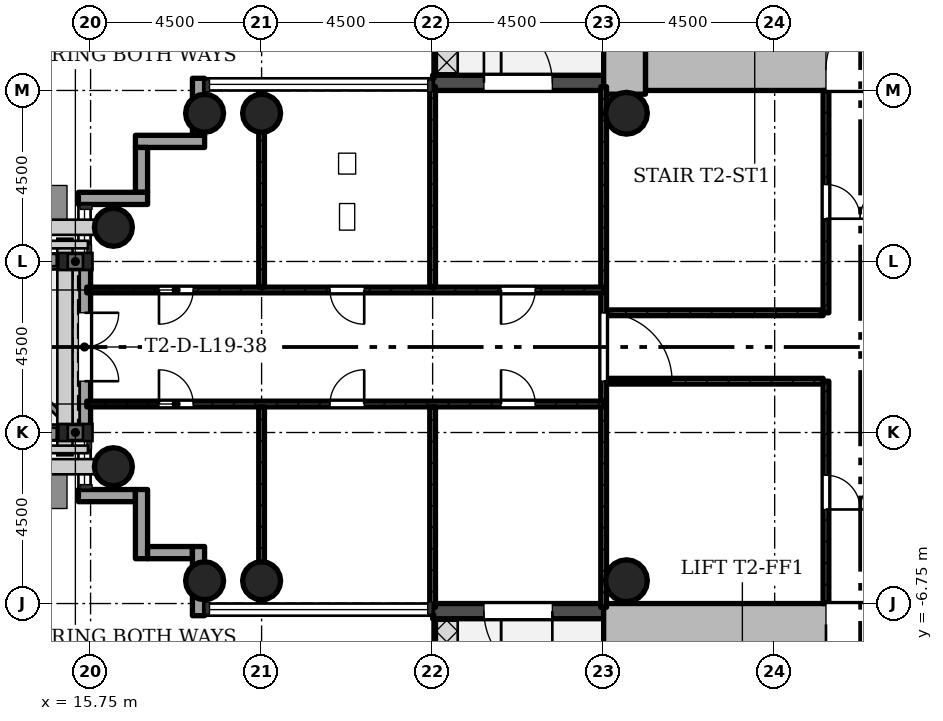
"""IFC4 building model, lengths in metres.
Left out: names, types, materials, properties, quantities, classifications, styles, units other than length and angle.
Written with IfcOpenShell. Run it as: python <this file> out.ifc"""

import sys

from ifc_helpers import new_model, si_unit, direction, frame, frame_2d, origin, origin_2d, place, context, subcontext, project, spatial, rectangle, hollow_circle, extrude, element, fill, save


model = new_model("IFC4")
c1 = context("Model", 3, precision=1e-05, world=origin(), true_north=direction((0.0, 1.0)))
c2 = subcontext(c1, "Body", "Model", "MODEL_VIEW")
j1 = project(units=[si_unit("LENGTHUNIT", "METRE"), si_unit("PLANEANGLEUNIT", "RADIAN")], contexts=[c1])
p1 = place(None, origin())
s1 = spatial("IfcSite", under=j1, at=p1, CompositionType="ELEMENT")
p2 = place(p1, origin())
s2 = spatial("IfcBuilding", under=s1, at=p2, CompositionType="ELEMENT")
p3 = place(p2, frame((0.0, 0.0, 72.1)))
s3 = spatial("IfcBuildingStorey", under=s2, at=p3, CompositionType="ELEMENT", Elevation=72.1)
p4 = place(p3, frame((30.35, 7.3, 0.0), z_axis=(0.0, 0.0, 1.0), x_axis=(1.0, 0.0, 0.0)))
e1 = element("IfcWall", 1, at=p4, inside=s3, PredefinedType="SHEAR", context=c2, shape_type="SweptSolid", body=[
    extrude(rectangle(XDim=12.4, YDim=1.1, at=frame_2d((6.2, 0.0))), origin(), (0.0, 0.0, 1.0), 4.5),
])
p5 = place(p4, frame((4.75, 0.0, 0.0)))
e2 = element("IfcOpeningElement", 2, at=p5, cuts=e1, PredefinedType="OPENING", context=c2, shape_type="SweptSolid", body=[
    extrude(rectangle(XDim=1.8, YDim=2.1, at=frame_2d((0.9, 1.05))), frame((0.0, 0.56, 0.0), z_axis=(0.0, -1.0, 0.0), x_axis=(1.0, 0.0, 0.0)), (0.0, 0.0, 1.0), 1.12),
])
p6 = place(p3, frame((29.8, 15.248, 0.0), z_axis=(0.0, 0.0, 1.0), x_axis=(0.0, -1.0, 0.0)))
e3 = element("IfcWall", 3, at=p6, inside=s3, PredefinedType="SHEAR", context=c2, shape_type="SweptSolid", body=[
    extrude(rectangle(XDim=8.596, YDim=1.1, at=frame_2d((4.298, 0.0))), origin(), (0.0, 0.0, 1.0), 4.5),
])
p7 = place(p3, frame((41.65, -7.3, 0.0), z_axis=(0.0, 0.0, 1.0), x_axis=(-1.0, 0.0, 0.0)))
e4 = element("IfcWall", 4, at=p7, inside=s3, PredefinedType="SHEAR", context=c2, shape_type="SweptSolid", body=[
    extrude(rectangle(XDim=12.4, YDim=1.1, at=frame_2d((6.2, 0.0))), origin(), (0.0, 0.0, 1.0), 4.5),
])
p8 = place(p7, frame((4.75, 0.0, 0.0)))
e5 = element("IfcOpeningElement", 5, at=p8, cuts=e4, PredefinedType="OPENING", context=c2, shape_type="SweptSolid", body=[
    extrude(rectangle(XDim=1.8, YDim=2.1, at=frame_2d((0.9, 1.05))), frame((0.0, 0.56, 0.0), z_axis=(0.0, -1.0, 0.0), x_axis=(1.0, 0.0, 0.0)), (0.0, 0.0, 1.0), 1.12),
])
for number, where, z_axis, x_axis in (
    (6, (20.25, 6.15, 0.0), (0.0, 0.0, 1.0), (1.0, 0.0, 0.0)),
    (7, (20.25, -6.15, 0.0), (0.0, 0.0, 1.0), (1.0, 0.0, 0.0)),
    (8, (18.75, 6.15, 0.0), (0.0, 0.0, 1.0), (1.0, 0.0, 0.0)),
    (9, (18.75, -6.15, 0.0), (0.0, 0.0, 1.0), (1.0, 0.0, 0.0)),
    (10, (16.35, 3.15, 0.0), (0.0, 0.0, 1.0), (1.0, 0.0, 0.0)),
    (11, (16.35, -3.15, 0.0), (0.0, 0.0, 1.0), (1.0, 0.0, 0.0)),
):
    element("IfcColumn", number, at=place(p3, frame(where, z_axis=z_axis, x_axis=x_axis)), inside=s3, PredefinedType="COLUMN", context=c2, shape_type="SweptSolid", body=[
        extrude(hollow_circle(Radius=0.5, WallThickness=0.036, at=origin_2d()), origin(), (0.0, 0.0, 1.0), 4.5),
    ])
for number, where, z_axis, x_axis in (
    (12, (29.85, 6.15, 0.0), (0.0, 0.0, 1.0), (1.0, 0.0, 0.0)),
    (13, (29.85, -6.15, 0.0), (0.0, 0.0, 1.0), (1.0, 0.0, 0.0)),
):
    element("IfcColumn", number, at=place(p3, frame(where, z_axis=z_axis, x_axis=x_axis)), inside=s3, PredefinedType="COLUMN", context=c2, shape_type="SweptSolid", body=[
        extrude(hollow_circle(Radius=0.55, WallThickness=0.04, at=origin_2d()), origin(), (0.0, 0.0, 1.0), 4.5),
    ])
p9 = place(p3, frame((29.25, 6.95, -0.02), z_axis=(0.0, 0.0, 1.0), x_axis=(-1.0, 0.0, 0.0)))
e14 = element("IfcWall", 14, at=p9, inside=s3, PredefinedType="STANDARD", context=c2, shape_type="SweptSolid", body=[
    extrude(rectangle(XDim=4.5, YDim=0.4, at=frame_2d((2.25, 0.0))), origin(), (0.0, 0.0, 1.0), 4.22),
])
p10 = place(p9, frame((1.35, 0.0, 0.02)))
e15 = element("IfcOpeningElement", 15, at=p10, cuts=e14, PredefinedType="OPENING", context=c2, shape_type="SweptSolid", body=[
    extrude(rectangle(XDim=1.8, YDim=2.1, at=frame_2d((0.9, 1.05))), frame((0.0, 0.21, 0.0), z_axis=(0.0, -1.0, 0.0), x_axis=(1.0, 0.0, 0.0)), (0.0, 0.0, 1.0), 0.42),
])
p11 = place(p3, frame((18.59, 7.07, -0.3), z_axis=(0.0, 0.0, 1.0), x_axis=(0.0, -1.0, 0.0)))
e16 = element("IfcWall", 16, at=p11, inside=s3, PredefinedType="STANDARD", context=c2, shape_type="SweptSolid", body=[
    extrude(rectangle(XDim=1.5, YDim=0.32, at=frame_2d((0.75, 0.0))), origin(), (0.0, 0.0, 1.0), 4.5),
])
p12 = place(p3, frame((18.75, 5.41, -0.3), z_axis=(0.0, 0.0, 1.0), x_axis=(-1.0, 0.0, 0.0)))
e17 = element("IfcWall", 17, at=p12, inside=s3, PredefinedType="STANDARD", context=c2, shape_type="SweptSolid", body=[
    extrude(rectangle(XDim=1.82, YDim=0.32, at=frame_2d((0.91, 0.0))), origin(), (0.0, 0.0, 1.0), 4.5),
])
p13 = place(p3, frame((17.09, 5.25, -0.3), z_axis=(0.0, 0.0, 1.0), x_axis=(0.0, -1.0, 0.0)))
e18 = element("IfcWall", 18, at=p13, inside=s3, PredefinedType="STANDARD", context=c2, shape_type="SweptSolid", body=[
    extrude(rectangle(XDim=1.18, YDim=0.32, at=frame_2d((0.59, 0.0))), origin(), (0.0, 0.0, 1.0), 4.5),
])
p14 = place(p3, frame((17.25, 3.91, -0.3), z_axis=(0.0, 0.0, 1.0), x_axis=(-1.0, 0.0, 0.0)))
e19 = element("IfcWall", 19, at=p14, inside=s3, PredefinedType="STANDARD", context=c2, shape_type="SweptSolid", body=[
    extrude(rectangle(XDim=1.82, YDim=0.32, at=frame_2d((0.91, 0.0))), origin(), (0.0, 0.0, 1.0), 4.5),
])
p15 = place(p3, frame((15.59, 2.25, 0.0), z_axis=(0.0, 0.0, 1.0), x_axis=(0.0, -1.0, 0.0)))
e20 = element("IfcWall", 20, at=p15, inside=s3, PredefinedType="STANDARD", context=c2, shape_type="SweptSolid", body=[
    extrude(rectangle(XDim=4.5, YDim=0.32, at=frame_2d((2.25, 0.0))), origin(), (0.0, 0.0, 1.0), 4.2),
])
p16 = place(p15, frame((1.35, 0.0, 0.0)))
e21 = element("IfcOpeningElement", 21, at=p16, cuts=e20, PredefinedType="OPENING", context=c2, shape_type="SweptSolid", body=[
    extrude(rectangle(XDim=1.8, YDim=2.1, at=frame_2d((0.9, 1.05))), frame((0.0, 0.17, 0.0), z_axis=(0.0, -1.0, 0.0), x_axis=(1.0, 0.0, 0.0)), (0.0, 0.0, 1.0), 0.34),
])
p17 = place(p3, frame((15.43, -3.91, -0.3), z_axis=(0.0, 0.0, 1.0), x_axis=(1.0, 0.0, 0.0)))
e22 = element("IfcWall", 22, at=p17, inside=s3, PredefinedType="STANDARD", context=c2, shape_type="SweptSolid", body=[
    extrude(rectangle(XDim=1.5, YDim=0.32, at=frame_2d((0.75, 0.0))), origin(), (0.0, 0.0, 1.0), 4.5),
])
p18 = place(p3, frame((17.09, -3.75, -0.3), z_axis=(0.0, 0.0, 1.0), x_axis=(0.0, -1.0, 0.0)))
e23 = element("IfcWall", 23, at=p18, inside=s3, PredefinedType="STANDARD", context=c2, shape_type="SweptSolid", body=[
    extrude(rectangle(XDim=1.82, YDim=0.32, at=frame_2d((0.91, 0.0))), origin(), (0.0, 0.0, 1.0), 4.5),
])
p19 = place(p3, frame((17.25, -5.41, -0.3), z_axis=(0.0, 0.0, 1.0), x_axis=(1.0, 0.0, 0.0)))
e24 = element("IfcWall", 24, at=p19, inside=s3, PredefinedType="STANDARD", context=c2, shape_type="SweptSolid", body=[
    extrude(rectangle(XDim=1.18, YDim=0.32, at=frame_2d((0.59, 0.0))), origin(), (0.0, 0.0, 1.0), 4.5),
])
p20 = place(p3, frame((18.59, -5.25, -0.3), z_axis=(0.0, 0.0, 1.0), x_axis=(0.0, -1.0, 0.0)))
e25 = element("IfcWall", 25, at=p20, inside=s3, PredefinedType="STANDARD", context=c2, shape_type="SweptSolid", body=[
    extrude(rectangle(XDim=1.82, YDim=0.32, at=frame_2d((0.91, 0.0))), origin(), (0.0, 0.0, 1.0), 4.5),
])
p21 = place(p3, frame((24.75, -6.95, -0.02), z_axis=(0.0, 0.0, 1.0), x_axis=(1.0, 0.0, 0.0)))
e26 = element("IfcWall", 26, at=p21, inside=s3, PredefinedType="STANDARD", context=c2, shape_type="SweptSolid", body=[
    extrude(rectangle(XDim=4.5, YDim=0.4, at=frame_2d((2.25, 0.0))), origin(), (0.0, 0.0, 1.0), 4.22),
])
p22 = place(p21, frame((1.35, 0.0, 0.02)))
e27 = element("IfcOpeningElement", 27, at=p22, cuts=e26, PredefinedType="OPENING", context=c2, shape_type="SweptSolid", body=[
    extrude(rectangle(XDim=1.8, YDim=2.1, at=frame_2d((0.9, 1.05))), frame((0.0, 0.21, 0.0), z_axis=(0.0, -1.0, 0.0), x_axis=(1.0, 0.0, 0.0)), (0.0, 0.0, 1.0), 0.42),
])
p23 = place(p3, frame((35.1, 0.9, 0.0), z_axis=(0.0, 0.0, 1.0), x_axis=(0.0, 1.0, 0.0)))
e28 = element("IfcWall", 28, at=p23, inside=s3, PredefinedType="PARTITIONING", context=c2, shape_type="SweptSolid", body=[
    extrude(rectangle(XDim=5.85, YDim=0.15, at=frame_2d((2.925, 0.0))), origin(), (0.0, 0.0, 1.0), 4.08),
])
p24 = place(p23, frame((2.475, 0.0, 0.0)))
e29 = element("IfcOpeningElement", 29, at=p24, cuts=e28, PredefinedType="OPENING", context=c2, shape_type="SweptSolid", body=[
    extrude(rectangle(XDim=0.9, YDim=2.1, at=frame_2d((0.45, 1.05))), frame((0.0, 0.085, 0.0), z_axis=(0.0, -1.0, 0.0), x_axis=(1.0, 0.0, 0.0)), (0.0, 0.0, 1.0), 0.17),
])
p25 = place(p3, frame((35.025, 0.9, 0.0), z_axis=(0.0, 0.0, 1.0), x_axis=(-1.0, 0.0, 0.0)))
e30 = element("IfcWall", 30, at=p25, inside=s3, PredefinedType="PARTITIONING", context=c2, shape_type="SweptSolid", body=[
    extrude(rectangle(XDim=5.7, YDim=0.15, at=frame_2d((2.85, 0.0))), origin(), (0.0, 0.0, 1.0), 4.08),
])
p26 = place(p3, frame((35.1, -6.75, 0.0), z_axis=(0.0, 0.0, 1.0), x_axis=(0.0, 1.0, 0.0)))
e31 = element("IfcWall", 31, at=p26, inside=s3, PredefinedType="PARTITIONING", context=c2, shape_type="SweptSolid", body=[
    extrude(rectangle(XDim=5.85, YDim=0.15, at=frame_2d((2.925, 0.0))), origin(), (0.0, 0.0, 1.0), 4.08),
])
p27 = place(p26, frame((2.475, 0.0, 0.0)))
e32 = element("IfcOpeningElement", 32, at=p27, cuts=e31, PredefinedType="OPENING", context=c2, shape_type="SweptSolid", body=[
    extrude(rectangle(XDim=0.9, YDim=2.1, at=frame_2d((0.45, 1.05))), frame((0.0, 0.085, 0.0), z_axis=(0.0, -1.0, 0.0), x_axis=(1.0, 0.0, 0.0)), (0.0, 0.0, 1.0), 0.17),
])
p28 = place(p3, frame((35.025, -0.9, 0.0), z_axis=(0.0, 0.0, 1.0), x_axis=(-1.0, 0.0, 0.0)))
e33 = element("IfcWall", 33, at=p28, inside=s3, PredefinedType="PARTITIONING", context=c2, shape_type="SweptSolid", body=[
    extrude(rectangle(XDim=5.7, YDim=0.15, at=frame_2d((2.85, 0.0))), origin(), (0.0, 0.0, 1.0), 4.08),
])
p29 = place(p3, frame((29.25, -6.85, 0.0), z_axis=(0.0, 0.0, 1.0), x_axis=(0.0, 1.0, 0.0)))
e34 = element("IfcWall", 34, at=p29, inside=s3, PredefinedType="PARTITIONING", context=c2, shape_type="SweptSolid", body=[
    extrude(rectangle(XDim=13.7, YDim=0.15, at=frame_2d((6.85, 0.0))), origin(), (0.0, 0.0, 1.0), 4.08),
])
p30 = place(p29, frame((5.95, 0.0, 0.0)))
e35 = element("IfcOpeningElement", 35, at=p30, cuts=e34, PredefinedType="OPENING", context=c2, shape_type="SweptSolid", body=[
    extrude(rectangle(XDim=1.8, YDim=2.1, at=frame_2d((0.9, 1.05))), frame((0.0, 0.085, 0.0), z_axis=(0.0, -1.0, 0.0), x_axis=(1.0, 0.0, 0.0)), (0.0, 0.0, 1.0), 0.17),
])
p31 = place(p3, frame((29.25, 1.5, 0.0), z_axis=(0.0, 0.0, 1.0), x_axis=(-1.0, 0.0, 0.0)))
e36 = element("IfcWall", 36, at=p31, inside=s3, PredefinedType="PARTITIONING", context=c2, shape_type="SweptSolid", body=[
    extrude(rectangle(XDim=13.6, YDim=0.15, at=frame_2d((6.8, 0.0))), origin(), (0.0, 0.0, 1.0), 4.08),
])
p32 = place(p31, frame((1.8, 0.0, 0.0)))
e37 = element("IfcOpeningElement", 37, at=p32, cuts=e36, PredefinedType="OPENING", context=c2, shape_type="SweptSolid", body=[
    extrude(rectangle(XDim=0.9, YDim=2.1, at=frame_2d((0.45, 1.05))), frame((0.0, 0.085, 0.0), z_axis=(0.0, -1.0, 0.0), x_axis=(1.0, 0.0, 0.0)), (0.0, 0.0, 1.0), 0.17),
])
p33 = place(p31, frame((6.3, 0.0, 0.0)))
e38 = element("IfcOpeningElement", 38, at=p33, cuts=e36, PredefinedType="OPENING", context=c2, shape_type="SweptSolid", body=[
    extrude(rectangle(XDim=0.9, YDim=2.1, at=frame_2d((0.45, 1.05))), frame((0.0, 0.085, 0.0), z_axis=(0.0, -1.0, 0.0), x_axis=(1.0, 0.0, 0.0)), (0.0, 0.0, 1.0), 0.17),
])
p34 = place(p31, frame((10.8, 0.0, 0.0)))
e39 = element("IfcOpeningElement", 39, at=p34, cuts=e36, PredefinedType="OPENING", context=c2, shape_type="SweptSolid", body=[
    extrude(rectangle(XDim=0.9, YDim=2.1, at=frame_2d((0.45, 1.05))), frame((0.0, 0.085, 0.0), z_axis=(0.0, -1.0, 0.0), x_axis=(1.0, 0.0, 0.0)), (0.0, 0.0, 1.0), 0.17),
])
for number, where, z_axis, x_axis in (
    (40, (24.75, 1.575, 0.0), (0.0, 0.0, 1.0), (0.0, 1.0, 0.0)),
    (41, (20.25, 1.575, 0.0), (0.0, 0.0, 1.0), (0.0, 1.0, 0.0)),
):
    element("IfcWall", number, at=place(p3, frame(where, z_axis=z_axis, x_axis=x_axis)), inside=s3, PredefinedType="PARTITIONING", context=c2, shape_type="SweptSolid", body=[
        extrude(rectangle(XDim=5.275, YDim=0.15, at=frame_2d((2.638, 0.0))), origin(), (0.0, 0.0, 1.0), 4.08),
    ])
p35 = place(p3, frame((29.25, -1.5, 0.0), z_axis=(0.0, 0.0, 1.0), x_axis=(-1.0, 0.0, 0.0)))
e42 = element("IfcWall", 42, at=p35, inside=s3, PredefinedType="PARTITIONING", context=c2, shape_type="SweptSolid", body=[
    extrude(rectangle(XDim=13.6, YDim=0.15, at=frame_2d((6.8, 0.0))), origin(), (0.0, 0.0, 1.0), 4.08),
])
p36 = place(p35, frame((1.8, 0.0, 0.0)))
e43 = element("IfcOpeningElement", 43, at=p36, cuts=e42, PredefinedType="OPENING", context=c2, shape_type="SweptSolid", body=[
    extrude(rectangle(XDim=0.9, YDim=2.1, at=frame_2d((0.45, 1.05))), frame((0.0, 0.085, 0.0), z_axis=(0.0, -1.0, 0.0), x_axis=(1.0, 0.0, 0.0)), (0.0, 0.0, 1.0), 0.17),
])
p37 = place(p35, frame((6.3, 0.0, 0.0)))
e44 = element("IfcOpeningElement", 44, at=p37, cuts=e42, PredefinedType="OPENING", context=c2, shape_type="SweptSolid", body=[
    extrude(rectangle(XDim=0.9, YDim=2.1, at=frame_2d((0.45, 1.05))), frame((0.0, 0.085, 0.0), z_axis=(0.0, -1.0, 0.0), x_axis=(1.0, 0.0, 0.0)), (0.0, 0.0, 1.0), 0.17),
])
p38 = place(p35, frame((10.8, 0.0, 0.0)))
e45 = element("IfcOpeningElement", 45, at=p38, cuts=e42, PredefinedType="OPENING", context=c2, shape_type="SweptSolid", body=[
    extrude(rectangle(XDim=0.9, YDim=2.1, at=frame_2d((0.45, 1.05))), frame((0.0, 0.085, 0.0), z_axis=(0.0, -1.0, 0.0), x_axis=(1.0, 0.0, 0.0)), (0.0, 0.0, 1.0), 0.17),
])
for number, where, z_axis, x_axis in (
    (46, (24.75, -1.575, 0.0), (0.0, 0.0, 1.0), (0.0, -1.0, 0.0)),
    (47, (20.25, -1.575, 0.0), (0.0, 0.0, 1.0), (0.0, -1.0, 0.0)),
):
    element("IfcWall", number, at=place(p3, frame(where, z_axis=z_axis, x_axis=x_axis)), inside=s3, PredefinedType="PARTITIONING", context=c2, shape_type="SweptSolid", body=[
        extrude(rectangle(XDim=5.275, YDim=0.15, at=frame_2d((2.638, 0.0))), origin(), (0.0, 0.0, 1.0), 4.08),
    ])
p39 = place(p10, origin())
e48 = element("IfcDoor", 48, at=p39, inside=s3, OperationType="SINGLE_SWING_RIGHT", PredefinedType="DOOR", context=c2, shape_type="SweptSolid", body=[
    extrude(rectangle(XDim=1.8, YDim=2.1, at=frame_2d((0.9, 1.05))), frame((0.0, 0.025, 0.0), z_axis=(0.0, -1.0, 0.0), x_axis=(1.0, 0.0, 0.0)), (0.0, 0.0, 1.0), 0.05),
])
fill(e15, e48)
p40 = place(p16, origin())
e49 = element("IfcDoor", 49, at=p40, inside=s3, OperationType="DOUBLE_DOOR_SINGLE_SWING", PredefinedType="DOOR", context=c2, shape_type="SweptSolid", body=[
    extrude(rectangle(XDim=1.8, YDim=2.1, at=frame_2d((0.9, 1.05))), frame((0.0, 0.025, 0.0), z_axis=(0.0, -1.0, 0.0), x_axis=(1.0, 0.0, 0.0)), (0.0, 0.0, 1.0), 0.05),
])
fill(e21, e49)
p41 = place(p22, origin())
e50 = element("IfcDoor", 50, at=p41, inside=s3, OperationType="SINGLE_SWING_RIGHT", PredefinedType="DOOR", context=c2, shape_type="SweptSolid", body=[
    extrude(rectangle(XDim=1.8, YDim=2.1, at=frame_2d((0.9, 1.05))), frame((0.0, 0.025, 0.0), z_axis=(0.0, -1.0, 0.0), x_axis=(1.0, 0.0, 0.0)), (0.0, 0.0, 1.0), 0.05),
])
fill(e27, e50)
p42 = place(p24, origin())
e51 = element("IfcDoor", 51, at=p42, inside=s3, OperationType="SINGLE_SWING_LEFT", PredefinedType="DOOR", context=c2, shape_type="SweptSolid", body=[
    extrude(rectangle(XDim=0.9, YDim=2.1, at=frame_2d((0.45, 1.05))), frame((0.0, 0.025, 0.0), z_axis=(0.0, -1.0, 0.0), x_axis=(1.0, 0.0, 0.0)), (0.0, 0.0, 1.0), 0.05),
])
fill(e29, e51)
p43 = place(p27, origin())
e52 = element("IfcDoor", 52, at=p43, inside=s3, OperationType="SINGLE_SWING_LEFT", PredefinedType="DOOR", context=c2, shape_type="SweptSolid", body=[
    extrude(rectangle(XDim=0.9, YDim=2.1, at=frame_2d((0.45, 1.05))), frame((0.0, 0.025, 0.0), z_axis=(0.0, -1.0, 0.0), x_axis=(1.0, 0.0, 0.0)), (0.0, 0.0, 1.0), 0.05),
])
fill(e32, e52)
p44 = place(p30, origin())
e53 = element("IfcDoor", 53, at=p44, inside=s3, OperationType="SINGLE_SWING_LEFT", PredefinedType="DOOR", context=c2, shape_type="SweptSolid", body=[
    extrude(rectangle(XDim=1.8, YDim=2.1, at=frame_2d((0.9, 1.05))), frame((0.0, 0.025, 0.0), z_axis=(0.0, -1.0, 0.0), x_axis=(1.0, 0.0, 0.0)), (0.0, 0.0, 1.0), 0.05),
])
fill(e35, e53)
p45 = place(p32, origin())
e54 = element("IfcDoor", 54, at=p45, inside=s3, OperationType="SINGLE_SWING_LEFT", PredefinedType="DOOR", context=c2, shape_type="SweptSolid", body=[
    extrude(rectangle(XDim=0.9, YDim=2.1, at=frame_2d((0.45, 1.05))), frame((0.0, 0.025, 0.0), z_axis=(0.0, -1.0, 0.0), x_axis=(1.0, 0.0, 0.0)), (0.0, 0.0, 1.0), 0.05),
])
fill(e37, e54)
p46 = place(p33, origin())
e55 = element("IfcDoor", 55, at=p46, inside=s3, OperationType="SINGLE_SWING_RIGHT", PredefinedType="DOOR", context=c2, shape_type="SweptSolid", body=[
    extrude(rectangle(XDim=0.9, YDim=2.1, at=frame_2d((0.45, 1.05))), frame((0.0, 0.025, 0.0), z_axis=(0.0, -1.0, 0.0), x_axis=(1.0, 0.0, 0.0)), (0.0, 0.0, 1.0), 0.05),
])
fill(e38, e55)
p47 = place(p34, origin())
e56 = element("IfcDoor", 56, at=p47, inside=s3, OperationType="SINGLE_SWING_LEFT", PredefinedType="DOOR", context=c2, shape_type="SweptSolid", body=[
    extrude(rectangle(XDim=0.9, YDim=2.1, at=frame_2d((0.45, 1.05))), frame((0.0, 0.025, 0.0), z_axis=(0.0, -1.0, 0.0), x_axis=(1.0, 0.0, 0.0)), (0.0, 0.0, 1.0), 0.05),
])
fill(e39, e56)
p48 = place(p36, origin())
e57 = element("IfcDoor", 57, at=p48, inside=s3, OperationType="SINGLE_SWING_RIGHT", PredefinedType="DOOR", context=c2, shape_type="SweptSolid", body=[
    extrude(rectangle(XDim=0.9, YDim=2.1, at=frame_2d((0.45, 1.05))), frame((0.0, 0.025, 0.0), z_axis=(0.0, -1.0, 0.0), x_axis=(1.0, 0.0, 0.0)), (0.0, 0.0, 1.0), 0.05),
])
fill(e43, e57)
p49 = place(p37, origin())
e58 = element("IfcDoor", 58, at=p49, inside=s3, OperationType="SINGLE_SWING_LEFT", PredefinedType="DOOR", context=c2, shape_type="SweptSolid", body=[
    extrude(rectangle(XDim=0.9, YDim=2.1, at=frame_2d((0.45, 1.05))), frame((0.0, 0.025, 0.0), z_axis=(0.0, -1.0, 0.0), x_axis=(1.0, 0.0, 0.0)), (0.0, 0.0, 1.0), 0.05),
])
fill(e44, e58)
p50 = place(p38, origin())
e59 = element("IfcDoor", 59, at=p50, inside=s3, OperationType="SINGLE_SWING_RIGHT", PredefinedType="DOOR", context=c2, shape_type="SweptSolid", body=[
    extrude(rectangle(XDim=0.9, YDim=2.1, at=frame_2d((0.45, 1.05))), frame((0.0, 0.025, 0.0), z_axis=(0.0, -1.0, 0.0), x_axis=(1.0, 0.0, 0.0)), (0.0, 0.0, 1.0), 0.05),
])
fill(e45, e59)
p51 = place(p5, origin())
e60 = element("IfcDoor", 60, at=p51, inside=s3, OperationType="SINGLE_SWING_LEFT", PredefinedType="DOOR", context=c2, shape_type="SweptSolid", body=[
    extrude(rectangle(XDim=1.8, YDim=2.1, at=frame_2d((0.9, 1.05))), frame((0.0, 0.025, 0.0), z_axis=(0.0, -1.0, 0.0), x_axis=(1.0, 0.0, 0.0)), (0.0, 0.0, 1.0), 0.05),
])
fill(e2, e60)
p52 = place(p8, origin())
e61 = element("IfcDoor", 61, at=p52, inside=s3, OperationType="SINGLE_SWING_LEFT", PredefinedType="DOOR", context=c2, shape_type="SweptSolid", body=[
    extrude(rectangle(XDim=1.8, YDim=2.1, at=frame_2d((0.9, 1.05))), frame((0.0, 0.025, 0.0), z_axis=(0.0, -1.0, 0.0), x_axis=(1.0, 0.0, 0.0)), (0.0, 0.0, 1.0), 0.05),
])
fill(e5, e61)
save(model, sys.argv[1])
